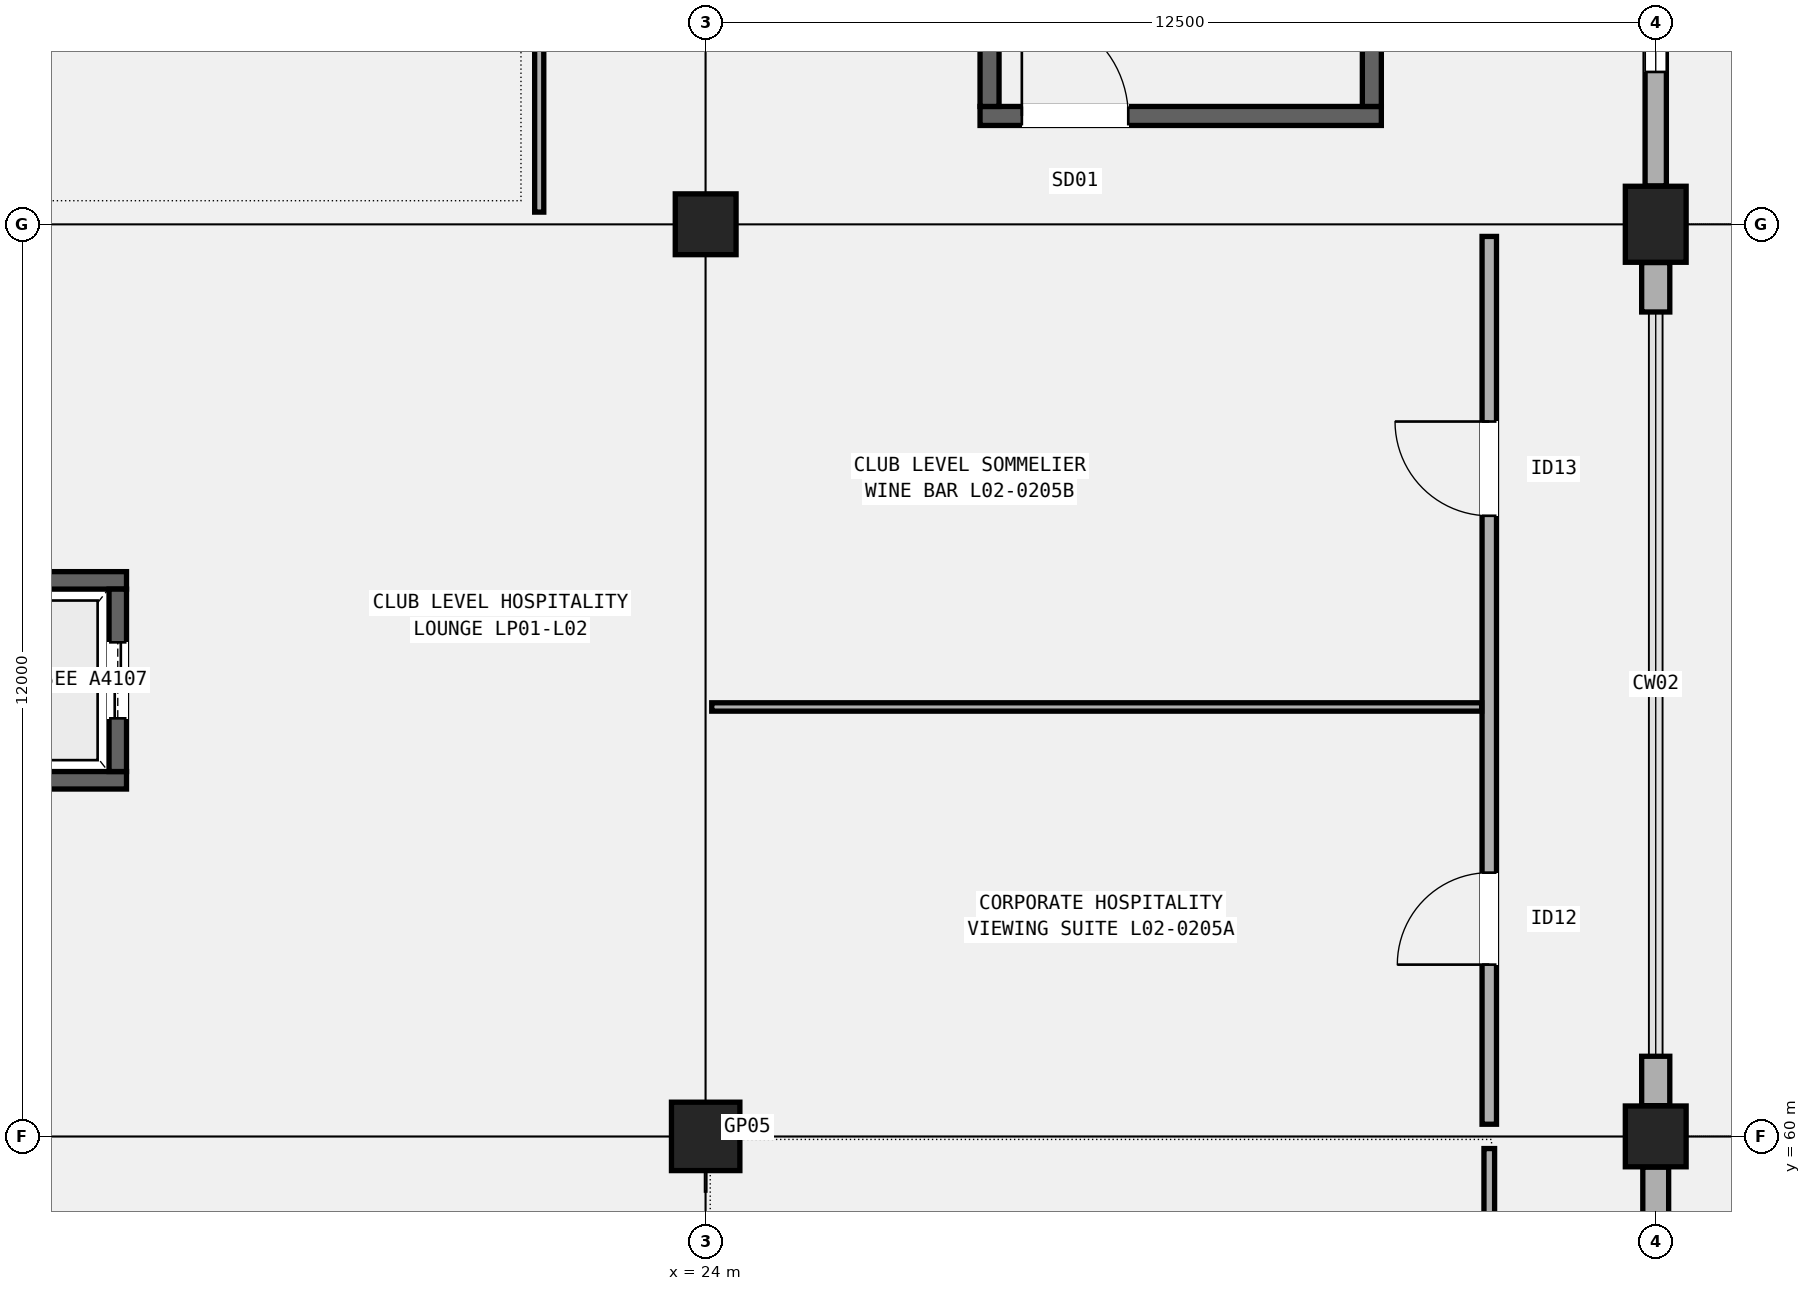
"""IFC4 building model, lengths in metres.
Left out: names, types, materials, properties, quantities, classifications, styles, units other than length and angle.
Written with IfcOpenShell. Run it as: python <this file> out.ifc"""

import sys

from ifc_helpers import new_model, si_unit, direction, frame, frame_2d, origin, origin_2d, place, context, subcontext, project, spatial, rectangle, extrude, element, fill, save


model = new_model("IFC4")
c1 = context("Model", 3, precision=1e-05, world=origin(), true_north=direction((0.0, 1.0)))
c2 = subcontext(c1, "Body", "Model", "MODEL_VIEW")
j1 = project(units=[si_unit("LENGTHUNIT", "METRE"), si_unit("PLANEANGLEUNIT", "RADIAN")], contexts=[c1])
p1 = place(None, origin())
s1 = spatial("IfcSite", under=j1, at=p1, CompositionType="ELEMENT")
p2 = place(p1, origin())
s2 = spatial("IfcBuilding", under=s1, at=p2, CompositionType="ELEMENT")
p3 = place(p2, frame((0.0, 0.0, 10.2)))
s3 = spatial("IfcBuildingStorey", under=s2, at=p3, CompositionType="ELEMENT", Elevation=10.2)
p4 = place(p3, frame((24.0, 60.0, 0.0), z_axis=(0.0, 0.0, 1.0), x_axis=(1.0, 0.0, 0.0)))
e1 = element("IfcColumn", 1, at=p4, inside=s3, PredefinedType="COLUMN", context=c2, shape_type="SweptSolid", body=[
    extrude(rectangle(XDim=0.9, YDim=0.9, at=origin_2d()), origin(), (0.0, 0.0, 1.0), 5.1),
])
for number, where, z_axis, x_axis in (
    (2, (24.0, 72.0, 0.0), (0.0, 0.0, 1.0), (1.0, 0.0, 0.0)),
    (3, (36.5, 60.0, 0.0), (0.0, 0.0, 1.0), (1.0, 0.0, 0.0)),
):
    element("IfcColumn", number, at=place(p3, frame(where, z_axis=z_axis, x_axis=x_axis)), inside=s3, PredefinedType="COLUMN", context=c2, shape_type="SweptSolid", body=[
        extrude(rectangle(XDim=0.8, YDim=0.8, at=origin_2d()), origin(), (0.0, 0.0, 1.0), 5.1),
    ])
p5 = place(p3, frame((36.5, 72.0, 0.0), z_axis=(0.0, 0.0, 1.0), x_axis=(1.0, 0.0, 0.0)))
e4 = element("IfcColumn", 4, at=p5, inside=s3, PredefinedType="COLUMN", context=c2, shape_type="SweptSolid", body=[
    extrude(rectangle(XDim=0.8, YDim=1.0, at=origin_2d()), origin(), (0.0, 0.0, 1.0), 5.1),
])
p6 = place(p3, frame((36.5, 48.454, 0.0), z_axis=(0.0, 0.0, 1.0), x_axis=(0.0, 1.0, 0.0)))
e5 = element("IfcWall", 5, at=p6, inside=s3, PredefinedType="SOLIDWALL", context=c2, shape_type="SweptSolid", body=[
    extrude(rectangle(XDim=11.142, YDim=0.34, at=frame_2d((5.571, 0.0))), origin(), (0.0, 0.0, 1.0), 4.12),
])
p7 = place(p6, frame((1.5, 0.0, 0.95)))
e6 = element("IfcOpeningElement", 6, at=p7, cuts=e5, PredefinedType="OPENING", context=c2, shape_type="SweptSolid", body=[
    extrude(rectangle(XDim=1.2, YDim=1.9, at=frame_2d((0.6, 0.95))), frame((0.0, 0.18, 0.0), z_axis=(0.0, -1.0, 0.0), x_axis=(1.0, 0.0, 0.0)), (0.0, 0.0, 1.0), 0.36),
])
p8 = place(p3, frame((36.5, 60.404, 0.0), z_axis=(0.0, 0.0, 1.0), x_axis=(0.0, 1.0, 0.0)))
e7 = element("IfcWall", 7, at=p8, inside=s3, PredefinedType="SOLIDWALL", context=c2, shape_type="SweptSolid", body=[
    extrude(rectangle(XDim=0.65, YDim=0.37, at=frame_2d((0.325, 0.0))), origin(), (0.0, 0.0, 1.0), 4.232),
])
p9 = place(p3, frame((36.5, 70.846, 0.0), z_axis=(0.0, 0.0, 1.0), x_axis=(0.0, 1.0, 0.0)))
e8 = element("IfcWall", 8, at=p9, inside=s3, PredefinedType="SOLIDWALL", context=c2, shape_type="SweptSolid", body=[
    extrude(rectangle(XDim=0.65, YDim=0.37, at=frame_2d((0.325, 0.0))), origin(), (0.0, 0.0, 1.0), 4.232),
])
p10 = place(p3, frame((36.5, 72.504, 0.0), z_axis=(0.0, 0.0, 1.0), x_axis=(0.0, 1.0, 0.0)))
e9 = element("IfcWall", 9, at=p10, inside=s3, PredefinedType="SOLIDWALL", context=c2, shape_type="SweptSolid", body=[
    extrude(rectangle(XDim=11.042, YDim=0.28, at=frame_2d((5.521, 0.0))), origin(), (0.0, 0.0, 1.0), 4.02),
])
p11 = place(p10, frame((1.5, 0.0, 0.95)))
e10 = element("IfcOpeningElement", 10, at=p11, cuts=e9, PredefinedType="OPENING", context=c2, shape_type="SweptSolid", body=[
    extrude(rectangle(XDim=1.2, YDim=2.3, at=frame_2d((0.6, 1.15))), frame((0.0, 0.15, 0.0), z_axis=(0.0, -1.0, 0.0), x_axis=(1.0, 0.0, 0.0)), (0.0, 0.0, 1.0), 0.3),
])
p12 = place(p3, frame((27.61, 73.425, 0.0), z_axis=(0.0, 0.0, 1.0), x_axis=(1.0, 0.0, 0.0)))
e11 = element("IfcWall", 11, at=p12, inside=s3, PredefinedType="SHEAR", context=c2, shape_type="SweptSolid", body=[
    extrude(rectangle(XDim=5.28, YDim=0.25, at=frame_2d((2.64, 0.0))), origin(), (0.0, 0.0, 1.0), 4.82),
])
p13 = place(p12, frame((0.55, 0.0, 0.0)))
e12 = element("IfcOpeningElement", 12, at=p13, cuts=e11, PredefinedType="OPENING", context=c2, shape_type="SweptSolid", body=[
    extrude(rectangle(XDim=1.4, YDim=2.15, at=frame_2d((0.7, 1.075))), frame((0.0, 0.135, 0.0), z_axis=(0.0, -1.0, 0.0), x_axis=(1.0, 0.0, 0.0)), (0.0, 0.0, 1.0), 0.27),
])
for number, where, z_axis, x_axis in (
    (13, (27.735, 73.55, 0.0), (0.0, 0.0, 1.0), (0.0, 1.0, 0.0)),
    (14, (32.765, 73.55, 0.0), (0.0, 0.0, 1.0), (0.0, 1.0, 0.0)),
):
    element("IfcWall", number, at=place(p3, frame(where, z_axis=z_axis, x_axis=x_axis)), inside=s3, PredefinedType="SHEAR", context=c2, shape_type="SweptSolid", body=[
        extrude(rectangle(XDim=8.9, YDim=0.25, at=frame_2d((4.45, 0.0))), origin(), (0.0, 0.0, 1.0), 4.82),
    ])
for number, where, z_axis, x_axis in (
    (15, (14.02, 64.685, 0.0), (0.0, 0.0, 1.0), (1.0, 0.0, 0.0)),
    (16, (14.02, 67.315, 0.0), (0.0, 0.0, 1.0), (1.0, 0.0, 0.0)),
):
    element("IfcWall", number, at=place(p3, frame(where, z_axis=z_axis, x_axis=x_axis)), inside=s3, PredefinedType="SHEAR", context=c2, shape_type="SweptSolid", body=[
        extrude(rectangle(XDim=2.36, YDim=0.23, at=frame_2d((1.18, 0.0))), origin(), (0.0, 0.0, 1.0), 4.82),
    ])
p14 = place(p3, frame((16.265, 64.8, 0.0), z_axis=(0.0, 0.0, 1.0), x_axis=(0.0, 1.0, 0.0)))
e17 = element("IfcWall", 17, at=p14, inside=s3, PredefinedType="SHEAR", context=c2, shape_type="SweptSolid", body=[
    extrude(rectangle(XDim=2.4, YDim=0.23, at=frame_2d((1.2, 0.0))), origin(), (0.0, 0.0, 1.0), 4.82),
])
p15 = place(p14, frame((0.7, 0.0, 0.0)))
e18 = element("IfcOpeningElement", 18, at=p15, cuts=e17, PredefinedType="OPENING", context=c2, shape_type="SweptSolid", body=[
    extrude(rectangle(XDim=1.0, YDim=2.15, at=frame_2d((0.5, 1.075))), frame((0.0, 0.125, 0.0), z_axis=(0.0, -1.0, 0.0), x_axis=(1.0, 0.0, 0.0)), (0.0, 0.0, 1.0), 0.25),
])
p16 = place(p3, frame((21.81, 72.16, 0.0), z_axis=(0.0, 0.0, 1.0), x_axis=(0.0, 1.0, 0.0)))
e19 = element("IfcWall", 19, at=p16, inside=s3, PredefinedType="PARTITIONING", context=c2, shape_type="SweptSolid", body=[
    extrude(rectangle(XDim=11.68, YDim=0.12, at=frame_2d((5.84, 0.0))), origin(), (0.0, 0.0, 1.0), 4.22),
])
p17 = place(p16, frame((5.365, 0.0, 0.0)))
e20 = element("IfcOpeningElement", 20, at=p17, cuts=e19, PredefinedType="OPENING", context=c2, shape_type="SweptSolid", body=[
    extrude(rectangle(XDim=0.95, YDim=2.12, at=frame_2d((0.475, 1.06))), frame((0.0, 0.07, 0.0), z_axis=(0.0, -1.0, 0.0), x_axis=(1.0, 0.0, 0.0)), (0.0, 0.0, 1.0), 0.14),
])
p18 = place(p3, frame((34.31, 48.16, 0.0), z_axis=(0.0, 0.0, 1.0), x_axis=(0.0, 1.0, 0.0)))
e21 = element("IfcWall", 21, at=p18, inside=s3, PredefinedType="PARTITIONING", context=c2, shape_type="SweptSolid", body=[
    extrude(rectangle(XDim=11.68, YDim=0.14, at=frame_2d((5.84, 0.0))), origin(), (0.0, 0.0, 1.0), 4.22),
])
p19 = place(p18, frame((2.13, 0.0, 0.0)))
e22 = element("IfcOpeningElement", 22, at=p19, cuts=e21, PredefinedType="OPENING", context=c2, shape_type="SweptSolid", body=[
    extrude(rectangle(XDim=1.15, YDim=2.15, at=frame_2d((0.575, 1.075))), frame((0.0, 0.08, 0.0), z_axis=(0.0, -1.0, 0.0), x_axis=(1.0, 0.0, 0.0)), (0.0, 0.0, 1.0), 0.16),
])
p20 = place(p18, frame((8.035, 0.0, 0.0)))
e23 = element("IfcOpeningElement", 23, at=p20, cuts=e21, PredefinedType="OPENING", context=c2, shape_type="SweptSolid", body=[
    extrude(rectangle(XDim=1.18, YDim=2.2, at=frame_2d((0.59, 1.1))), frame((0.0, 0.08, 0.0), z_axis=(0.0, -1.0, 0.0), x_axis=(1.0, 0.0, 0.0)), (0.0, 0.0, 1.0), 0.16),
])
p21 = place(p3, frame((34.31, 60.16, 0.0), z_axis=(0.0, 0.0, 1.0), x_axis=(0.0, 1.0, 0.0)))
e24 = element("IfcWall", 24, at=p21, inside=s3, PredefinedType="PARTITIONING", context=c2, shape_type="SweptSolid", body=[
    extrude(rectangle(XDim=11.68, YDim=0.19, at=frame_2d((5.84, 0.0))), origin(), (0.0, 0.0, 1.0), 4.22),
])
p22 = place(p21, frame((2.1, 0.0, 0.0)))
e25 = element("IfcOpeningElement", 25, at=p22, cuts=e24, PredefinedType="OPENING", context=c2, shape_type="SweptSolid", body=[
    extrude(rectangle(XDim=1.21, YDim=2.18, at=frame_2d((0.605, 1.09))), frame((0.0, 0.105, 0.0), z_axis=(0.0, -1.0, 0.0), x_axis=(1.0, 0.0, 0.0)), (0.0, 0.0, 1.0), 0.21),
])
p23 = place(p21, frame((8.005, 0.0, 0.0)))
e26 = element("IfcOpeningElement", 26, at=p23, cuts=e24, PredefinedType="OPENING", context=c2, shape_type="SweptSolid", body=[
    extrude(rectangle(XDim=1.24, YDim=2.22, at=frame_2d((0.62, 1.11))), frame((0.0, 0.105, 0.0), z_axis=(0.0, -1.0, 0.0), x_axis=(1.0, 0.0, 0.0)), (0.0, 0.0, 1.0), 0.21),
])
p24 = place(p3, frame((24.08, 65.65, 0.0), z_axis=(0.0, 0.0, 1.0), x_axis=(1.0, 0.0, 0.0)))
e27 = element("IfcWall", 27, at=p24, inside=s3, PredefinedType="PARTITIONING", context=c2, shape_type="SweptSolid", body=[
    extrude(rectangle(XDim=10.13, YDim=0.11, at=frame_2d((5.065, 0.0))), origin(), (0.0, 0.0, 1.0), 4.22),
])
p25 = place(p11, origin())
e28 = element("IfcWindow", 28, at=p25, inside=s3, PartitioningType="SINGLE_PANEL", PredefinedType="WINDOW", context=c2, shape_type="SweptSolid", body=[
    extrude(rectangle(XDim=1.2, YDim=2.3, at=frame_2d((0.6, 1.15))), frame((0.0, 0.03, 0.0), z_axis=(0.0, -1.0, 0.0), x_axis=(1.0, 0.0, 0.0)), (0.0, 0.0, 1.0), 0.06),
])
fill(e10, e28)
p26 = place(p13, origin())
e29 = element("IfcDoor", 29, at=p26, inside=s3, OperationType="SINGLE_SWING_LEFT", PredefinedType="DOOR", context=c2, shape_type="SweptSolid", body=[
    extrude(rectangle(XDim=1.4, YDim=2.15, at=frame_2d((0.7, 1.075))), frame((0.0, 0.025, 0.0), z_axis=(0.0, -1.0, 0.0), x_axis=(1.0, 0.0, 0.0)), (0.0, 0.0, 1.0), 0.05),
])
fill(e12, e29)
p27 = place(p15, origin())
e30 = element("IfcDoor", 30, at=p27, inside=s3, OperationType="DOUBLE_DOOR_SLIDING", PredefinedType="DOOR", context=c2, shape_type="SweptSolid", body=[
    extrude(rectangle(XDim=1.0, YDim=2.15, at=frame_2d((0.5, 1.075))), frame((0.0, 0.025, 0.0), z_axis=(0.0, -1.0, 0.0), x_axis=(1.0, 0.0, 0.0)), (0.0, 0.0, 1.0), 0.05),
])
fill(e18, e30)
p28 = place(p22, origin())
e31 = element("IfcDoor", 31, at=p28, inside=s3, OperationType="SINGLE_SWING_LEFT", PredefinedType="DOOR", context=c2, shape_type="SweptSolid", body=[
    extrude(rectangle(XDim=1.21, YDim=2.18, at=frame_2d((0.605, 1.09))), frame((0.0, 0.025, 0.0), z_axis=(0.0, -1.0, 0.0), x_axis=(1.0, 0.0, 0.0)), (0.0, 0.0, 1.0), 0.05),
])
fill(e25, e31)
p29 = place(p23, origin())
e32 = element("IfcDoor", 32, at=p29, inside=s3, OperationType="SINGLE_SWING_RIGHT", PredefinedType="DOOR", context=c2, shape_type="SweptSolid", body=[
    extrude(rectangle(XDim=1.24, YDim=2.22, at=frame_2d((0.62, 1.11))), frame((0.0, 0.025, 0.0), z_axis=(0.0, -1.0, 0.0), x_axis=(1.0, 0.0, 0.0)), (0.0, 0.0, 1.0), 0.05),
])
fill(e26, e32)
save(model, sys.argv[1])
